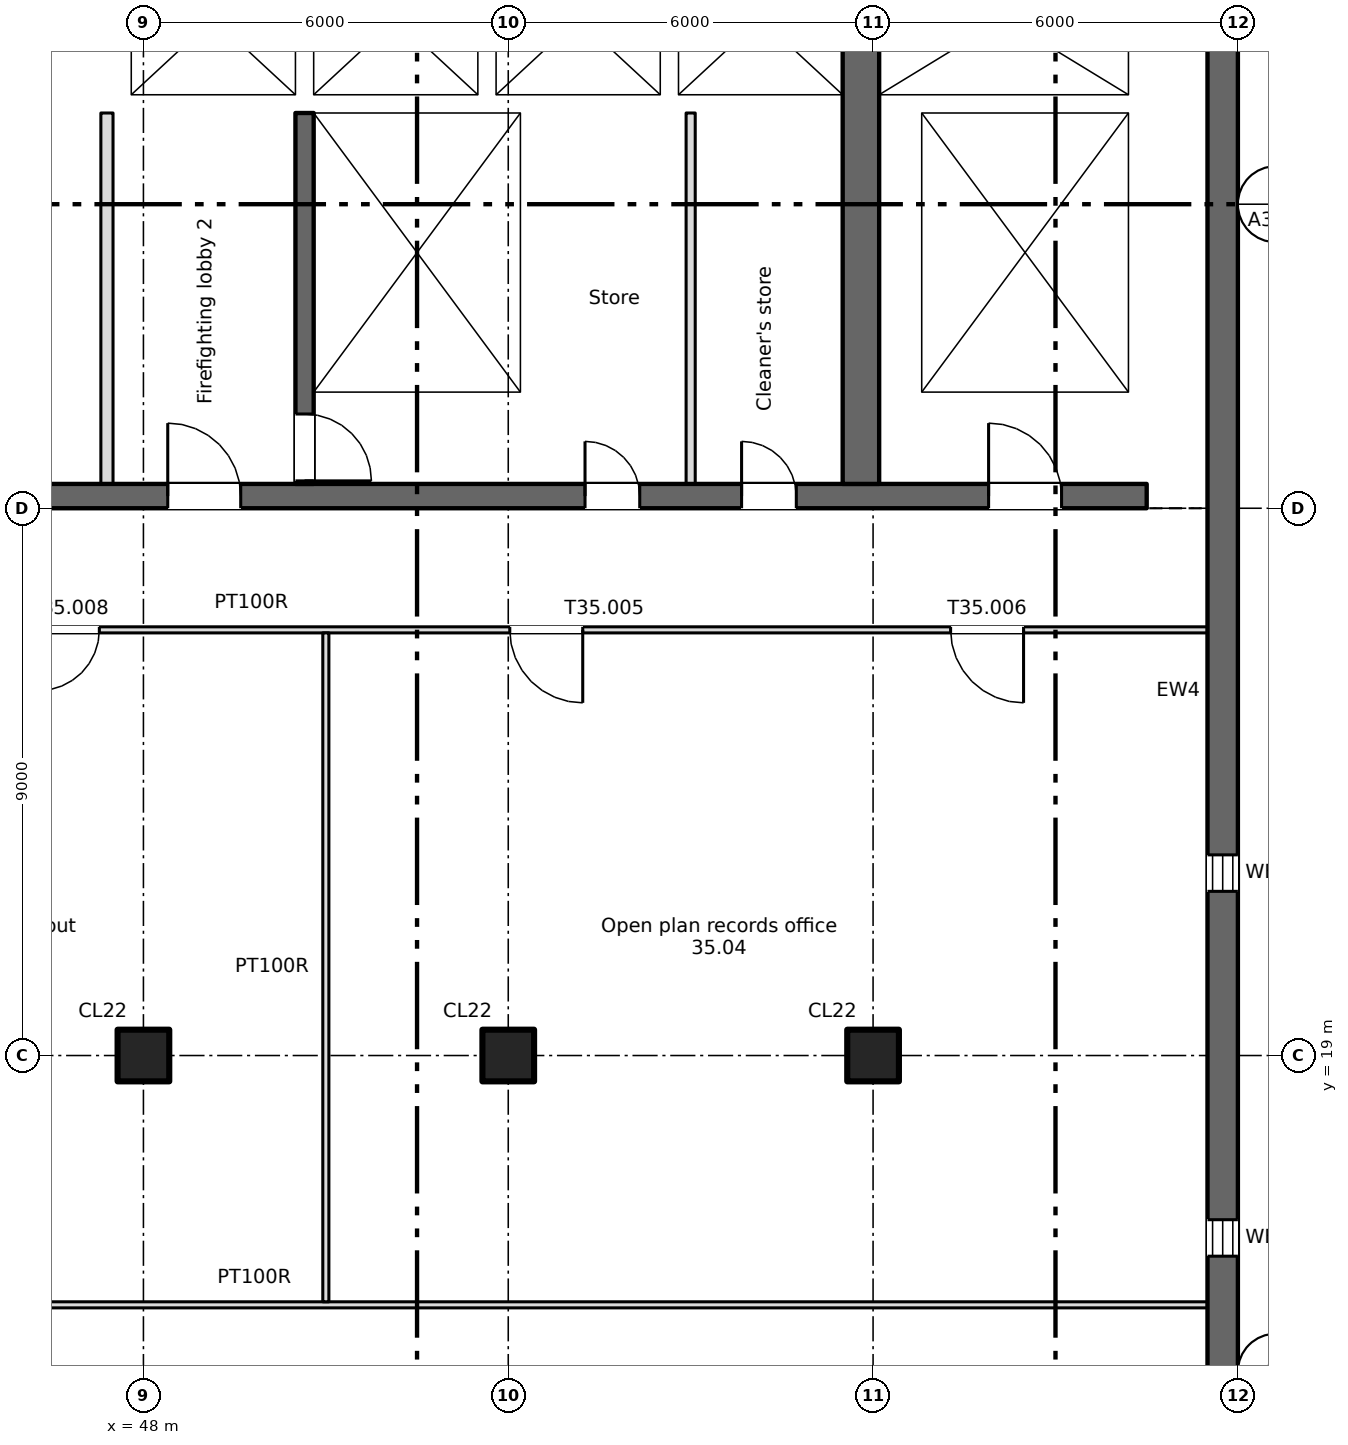
"""IFC4 building model, lengths in metres.
Left out: names, types, materials, properties, quantities, classifications, styles, units other than length and angle.
Written with IfcOpenShell. Run it as: python <this file> out.ifc"""

import sys

from ifc_helpers import new_model, si_unit, direction, frame, frame_2d, origin, origin_2d, place, context, subcontext, project, spatial, rectangle, extrude, element, fill, save


model = new_model("IFC4")
c1 = context("Model", 3, precision=1e-05, world=origin(), true_north=direction((0.0, 1.0)))
c2 = subcontext(c1, "Body", "Model", "MODEL_VIEW")
j1 = project(units=[si_unit("LENGTHUNIT", "METRE"), si_unit("PLANEANGLEUNIT", "RADIAN")], contexts=[c1])
p1 = place(None, origin())
s1 = spatial("IfcSite", under=j1, at=p1, CompositionType="ELEMENT")
p2 = place(p1, origin())
s2 = spatial("IfcBuilding", under=s1, at=p2, CompositionType="ELEMENT")
p3 = place(p2, frame((0.0, 0.0, 246.95)))
s3 = spatial("IfcBuildingStorey", under=s2, at=p3, CompositionType="ELEMENT", Elevation=246.95)
for number, where, z_axis, x_axis in (
    (1, (48.0, 19.0, 0.0), (0.0, 0.0, 1.0), (1.0, 0.0, 0.0)),
    (2, (54.0, 19.0, 0.0), (0.0, 0.0, 1.0), (1.0, 0.0, 0.0)),
    (3, (60.0, 19.0, 0.0), (0.0, 0.0, 1.0), (1.0, 0.0, 0.0)),
):
    element("IfcColumn", number, at=place(p3, frame(where, z_axis=z_axis, x_axis=x_axis)), inside=s3, PredefinedType="COLUMN", context=c2, shape_type="SweptSolid", body=[
        extrude(rectangle(XDim=0.85, YDim=0.85, at=origin_2d()), origin(), (0.0, 0.0, 1.0), 3.4),
    ])
p4 = place(p3, frame((65.75, 8.5, 0.0), z_axis=(0.0, 0.0, 1.0), x_axis=(0.0, 1.0, 0.0)))
e4 = element("IfcWall", 4, at=p4, inside=s3, PredefinedType="SHEAR", context=c2, shape_type="SweptSolid", body=[
    extrude(rectangle(XDim=33.0, YDim=0.5, at=frame_2d((16.5, 0.0))), origin(), (0.0, 0.0, 1.0), 3.4),
])
p5 = place(p4, frame((1.2, 0.0, 0.6)))
e5 = element("IfcOpeningElement", 5, at=p5, cuts=e4, PredefinedType="OPENING", context=c2, shape_type="SweptSolid", body=[
    extrude(rectangle(XDim=0.6, YDim=2.4, at=frame_2d((0.3, 1.2))), frame((0.0, 0.26, 0.0), z_axis=(0.0, -1.0, 0.0), x_axis=(1.0, 0.0, 0.0)), (0.0, 0.0, 1.0), 0.52),
])
p6 = place(p4, frame((7.2, 0.0, 0.6)))
e6 = element("IfcOpeningElement", 6, at=p6, cuts=e4, PredefinedType="OPENING", context=c2, shape_type="SweptSolid", body=[
    extrude(rectangle(XDim=0.6, YDim=2.4, at=frame_2d((0.3, 1.2))), frame((0.0, 0.26, 0.0), z_axis=(0.0, -1.0, 0.0), x_axis=(1.0, 0.0, 0.0)), (0.0, 0.0, 1.0), 0.52),
])
p7 = place(p4, frame((13.2, 0.0, 0.6)))
e7 = element("IfcOpeningElement", 7, at=p7, cuts=e4, PredefinedType="OPENING", context=c2, shape_type="SweptSolid", body=[
    extrude(rectangle(XDim=0.6, YDim=2.4, at=frame_2d((0.3, 1.2))), frame((0.0, 0.26, 0.0), z_axis=(0.0, -1.0, 0.0), x_axis=(1.0, 0.0, 0.0)), (0.0, 0.0, 1.0), 0.52),
])
p8 = place(p3, frame((6.5, 28.2, 0.0), z_axis=(0.0, 0.0, 1.0), x_axis=(1.0, 0.0, 0.0)))
e8 = element("IfcWall", 8, at=p8, inside=s3, PredefinedType="SHEAR", context=c2, shape_type="SweptSolid", body=[
    extrude(rectangle(XDim=58.0, YDim=0.4, at=frame_2d((29.0, 0.0))), origin(), (0.0, 0.0, 1.0), 3.4),
])
p9 = place(p8, frame((14.05, 0.0, 0.0)))
e9 = element("IfcOpeningElement", 9, at=p9, cuts=e8, PredefinedType="OPENING", context=c2, shape_type="SweptSolid", body=[
    extrude(rectangle(XDim=0.9, YDim=2.1, at=frame_2d((0.45, 1.05))), frame((0.0, 0.21, 0.0), z_axis=(0.0, -1.0, 0.0), x_axis=(1.0, 0.0, 0.0)), (0.0, 0.0, 1.0), 0.42),
])
p10 = place(p8, frame((48.762, 0.0, 0.0)))
e10 = element("IfcOpeningElement", 10, at=p10, cuts=e8, PredefinedType="OPENING", context=c2, shape_type="SweptSolid", body=[
    extrude(rectangle(XDim=0.9, YDim=2.1, at=frame_2d((0.45, 1.05))), frame((0.0, 0.21, 0.0), z_axis=(0.0, -1.0, 0.0), x_axis=(1.0, 0.0, 0.0)), (0.0, 0.0, 1.0), 0.42),
])
p11 = place(p8, frame((51.337, 0.0, 0.0)))
e11 = element("IfcOpeningElement", 11, at=p11, cuts=e8, PredefinedType="OPENING", context=c2, shape_type="SweptSolid", body=[
    extrude(rectangle(XDim=0.9, YDim=2.1, at=frame_2d((0.45, 1.05))), frame((0.0, 0.21, 0.0), z_axis=(0.0, -1.0, 0.0), x_axis=(1.0, 0.0, 0.0)), (0.0, 0.0, 1.0), 0.42),
])
p12 = place(p8, frame((1.55, 0.0, 0.0)))
e12 = element("IfcOpeningElement", 12, at=p12, cuts=e8, PredefinedType="OPENING", context=c2, shape_type="SweptSolid", body=[
    extrude(rectangle(XDim=0.9, YDim=2.1, at=frame_2d((0.45, 1.05))), frame((0.0, 0.21, 0.0), z_axis=(0.0, -1.0, 0.0), x_axis=(1.0, 0.0, 0.0)), (0.0, 0.0, 1.0), 0.42),
])
p13 = place(p8, frame((4.9, 0.0, 0.0)))
e13 = element("IfcOpeningElement", 13, at=p13, cuts=e8, PredefinedType="OPENING", context=c2, shape_type="SweptSolid", body=[
    extrude(rectangle(XDim=1.2, YDim=2.1, at=frame_2d((0.6, 1.05))), frame((0.0, 0.21, 0.0), z_axis=(0.0, -1.0, 0.0), x_axis=(1.0, 0.0, 0.0)), (0.0, 0.0, 1.0), 0.42),
])
p14 = place(p8, frame((31.9, 0.0, 0.0)))
e14 = element("IfcOpeningElement", 14, at=p14, cuts=e8, PredefinedType="OPENING", context=c2, shape_type="SweptSolid", body=[
    extrude(rectangle(XDim=1.2, YDim=2.1, at=frame_2d((0.6, 1.05))), frame((0.0, 0.21, 0.0), z_axis=(0.0, -1.0, 0.0), x_axis=(1.0, 0.0, 0.0)), (0.0, 0.0, 1.0), 0.42),
])
p15 = place(p8, frame((55.4, 0.0, 0.0)))
e15 = element("IfcOpeningElement", 15, at=p15, cuts=e8, PredefinedType="OPENING", context=c2, shape_type="SweptSolid", body=[
    extrude(rectangle(XDim=1.2, YDim=2.1, at=frame_2d((0.6, 1.05))), frame((0.0, 0.21, 0.0), z_axis=(0.0, -1.0, 0.0), x_axis=(1.0, 0.0, 0.0)), (0.0, 0.0, 1.0), 0.42),
])
p16 = place(p8, frame((21.9, 0.0, 0.0)))
e16 = element("IfcOpeningElement", 16, at=p16, cuts=e8, PredefinedType="OPENING", context=c2, shape_type="SweptSolid", body=[
    extrude(rectangle(XDim=1.2, YDim=2.1, at=frame_2d((0.6, 1.05))), frame((0.0, 0.21, 0.0), z_axis=(0.0, -1.0, 0.0), x_axis=(1.0, 0.0, 0.0)), (0.0, 0.0, 1.0), 0.42),
])
p17 = place(p8, frame((41.9, 0.0, 0.0)))
e17 = element("IfcOpeningElement", 17, at=p17, cuts=e8, PredefinedType="OPENING", context=c2, shape_type="SweptSolid", body=[
    extrude(rectangle(XDim=1.2, YDim=2.1, at=frame_2d((0.6, 1.05))), frame((0.0, 0.21, 0.0), z_axis=(0.0, -1.0, 0.0), x_axis=(1.0, 0.0, 0.0)), (0.0, 0.0, 1.0), 0.42),
])
p18 = place(p8, frame((25.05, 0.0, 0.0)))
e18 = element("IfcOpeningElement", 18, at=p18, cuts=e8, PredefinedType="OPENING", context=c2, shape_type="SweptSolid", body=[
    extrude(rectangle(XDim=2.4, YDim=2.1, at=frame_2d((1.2, 1.05))), frame((0.0, 0.21, 0.0), z_axis=(0.0, -1.0, 0.0), x_axis=(1.0, 0.0, 0.0)), (0.0, 0.0, 1.0), 0.42),
])
p19 = place(p8, frame((37.55, 0.0, 0.0)))
e19 = element("IfcOpeningElement", 19, at=p19, cuts=e8, PredefinedType="OPENING", context=c2, shape_type="SweptSolid", body=[
    extrude(rectangle(XDim=2.4, YDim=2.1, at=frame_2d((1.2, 1.05))), frame((0.0, 0.21, 0.0), z_axis=(0.0, -1.0, 0.0), x_axis=(1.0, 0.0, 0.0)), (0.0, 0.0, 1.0), 0.42),
])
p20 = place(p8, frame((8.25, 0.0, 0.0)))
e20 = element("IfcOpeningElement", 20, at=p20, cuts=e8, PredefinedType="OPENING", context=c2, shape_type="SweptSolid", body=[
    extrude(rectangle(XDim=2.4, YDim=2.1, at=frame_2d((1.2, 1.05))), frame((0.0, 0.21, 0.0), z_axis=(0.0, -1.0, 0.0), x_axis=(1.0, 0.0, 0.0)), (0.0, 0.0, 1.0), 0.42),
])
p21 = place(p8, frame((29.05, 0.0, 0.0)))
e21 = element("IfcOpeningElement", 21, at=p21, cuts=e8, PredefinedType="OPENING", context=c2, shape_type="SweptSolid", body=[
    extrude(rectangle(XDim=0.9, YDim=2.1, at=frame_2d((0.45, 1.05))), frame((0.0, 0.21, 0.0), z_axis=(0.0, -1.0, 0.0), x_axis=(1.0, 0.0, 0.0)), (0.0, 0.0, 1.0), 0.42),
])
p22 = place(p8, frame((35.05, 0.0, 0.0)))
e22 = element("IfcOpeningElement", 22, at=p22, cuts=e8, PredefinedType="OPENING", context=c2, shape_type="SweptSolid", body=[
    extrude(rectangle(XDim=0.9, YDim=2.1, at=frame_2d((0.45, 1.05))), frame((0.0, 0.21, 0.0), z_axis=(0.0, -1.0, 0.0), x_axis=(1.0, 0.0, 0.0)), (0.0, 0.0, 1.0), 0.42),
])
p23 = place(p3, frame((64.35, 34.8, 0.0), z_axis=(0.0, 0.0, 1.0), x_axis=(0.0, 1.0, 0.0)))
e23 = element("IfcWall", 23, at=p23, inside=s3, PredefinedType="SHEAR", context=c2, shape_type="SweptSolid", body=[
    extrude(rectangle(XDim=6.45, YDim=0.3, at=frame_2d((3.225, 0.0))), origin(), (0.0, 0.0, 1.0), 3.4),
])
p24 = place(p3, frame((59.8, 28.4, 0.0), z_axis=(0.0, 0.0, 1.0), x_axis=(0.0, 1.0, 0.0)))
e24 = element("IfcWall", 24, at=p24, inside=s3, PredefinedType="SHEAR", context=c2, shape_type="SweptSolid", body=[
    extrude(rectangle(XDim=15.1, YDim=0.6, at=frame_2d((7.55, 0.0))), origin(), (0.0, 0.0, 1.0), 3.4),
])
p25 = place(p24, frame((9.6, 0.0, 0.0)))
e25 = element("IfcOpeningElement", 25, at=p25, cuts=e24, PredefinedType="OPENING", context=c2, shape_type="SweptSolid", body=[
    extrude(rectangle(XDim=2.0, YDim=2.1, at=frame_2d((1.0, 1.05))), frame((0.0, 0.31, 0.0), z_axis=(0.0, -1.0, 0.0), x_axis=(1.0, 0.0, 0.0)), (0.0, 0.0, 1.0), 0.62),
])
p26 = place(p3, frame((50.65, 34.5, 0.0), z_axis=(0.0, 0.0, 1.0), x_axis=(0.0, -1.0, 0.0)))
e26 = element("IfcWall", 26, at=p26, inside=s3, PredefinedType="SHEAR", context=c2, shape_type="SweptSolid", body=[
    extrude(rectangle(XDim=6.1, YDim=0.3, at=frame_2d((3.05, 0.0))), origin(), (0.0, 0.0, 1.0), 3.4),
])
p27 = place(p26, frame((4.95, 0.0, 0.0)))
e27 = element("IfcOpeningElement", 27, at=p27, cuts=e26, PredefinedType="OPENING", context=c2, shape_type="SweptSolid", body=[
    extrude(rectangle(XDim=1.1, YDim=2.1, at=frame_2d((0.55, 1.05))), frame((0.0, 0.16, 0.0), z_axis=(0.0, -1.0, 0.0), x_axis=(1.0, 0.0, 0.0)), (0.0, 0.0, 1.0), 0.32),
])
p28 = place(p3, frame((54.35, 28.4, 0.0), z_axis=(0.0, 0.0, 1.0), x_axis=(0.0, 1.0, 0.0)))
e28 = element("IfcWall", 28, at=p28, inside=s3, PredefinedType="SHEAR", context=c2, shape_type="SweptSolid", body=[
    extrude(rectangle(XDim=6.1, YDim=0.3, at=frame_2d((3.05, 0.0))), origin(), (0.0, 0.0, 1.0), 3.4),
])
p29 = place(p3, frame((60.45, 28.4, 0.0), z_axis=(0.0, 0.0, 1.0), x_axis=(0.0, 1.0, 0.0)))
e29 = element("IfcWall", 29, at=p29, inside=s3, PredefinedType="SHEAR", context=c2, shape_type="SweptSolid", body=[
    extrude(rectangle(XDim=6.1, YDim=0.7, at=frame_2d((3.05, 0.0))), origin(), (0.0, 0.0, 1.0), 3.4),
])
p30 = place(p3, frame((64.35, 28.4, 0.0), z_axis=(0.0, 0.0, 1.0), x_axis=(0.0, 1.0, 0.0)))
e30 = element("IfcWall", 30, at=p30, inside=s3, PredefinedType="SHEAR", context=c2, shape_type="SweptSolid", body=[
    extrude(rectangle(XDim=6.1, YDim=0.3, at=frame_2d((3.05, 0.0))), origin(), (0.0, 0.0, 1.0), 3.4),
])
p31 = place(p3, frame((47.3, 34.65, 0.0), z_axis=(0.0, 0.0, 1.0), x_axis=(1.0, 0.0, 0.0)))
e31 = element("IfcWall", 31, at=p31, inside=s3, PredefinedType="SHEAR", context=c2, shape_type="SweptSolid", body=[
    extrude(rectangle(XDim=12.2, YDim=0.3, at=frame_2d((6.1, 0.0))), origin(), (0.0, 0.0, 1.0), 3.4),
])
p32 = place(p31, frame((1.3, 0.0, 0.0)))
e32 = element("IfcOpeningElement", 32, at=p32, cuts=e31, PredefinedType="OPENING", context=c2, shape_type="SweptSolid", body=[
    extrude(rectangle(XDim=1.1, YDim=2.1, at=frame_2d((0.55, 1.05))), frame((0.0, 0.16, 0.0), z_axis=(0.0, -1.0, 0.0), x_axis=(1.0, 0.0, 0.0)), (0.0, 0.0, 1.0), 0.32),
])
p33 = place(p3, frame((60.1, 34.65, 0.0), z_axis=(0.0, 0.0, 1.0), x_axis=(1.0, 0.0, 0.0)))
e33 = element("IfcWall", 33, at=p33, inside=s3, PredefinedType="SHEAR", context=c2, shape_type="SweptSolid", body=[
    extrude(rectangle(XDim=4.4, YDim=0.3, at=frame_2d((2.2, 0.0))), origin(), (0.0, 0.0, 1.0), 3.4),
])
p34 = place(p3, frame((47.55, 34.8, 0.0), z_axis=(0.0, 0.0, 1.0), x_axis=(0.0, 1.0, 0.0)))
e34 = element("IfcWall", 34, at=p34, inside=s3, PredefinedType="SHEAR", context=c2, shape_type="SweptSolid", body=[
    extrude(rectangle(XDim=2.5, YDim=0.5, at=frame_2d((1.25, 0.0))), origin(), (0.0, 0.0, 1.0), 3.4),
])
for number, where, z_axis, x_axis in (
    (35, (50.65, 34.8, 0.0), (0.0, 0.0, 1.0), (0.0, 1.0, 0.0)),
    (36, (53.65, 34.8, 0.0), (0.0, 0.0, 1.0), (0.0, 1.0, 0.0)),
    (37, (56.65, 34.8, 0.0), (0.0, 0.0, 1.0), (0.0, 1.0, 0.0)),
):
    element("IfcWall", number, at=place(p3, frame(where, z_axis=z_axis, x_axis=x_axis)), inside=s3, PredefinedType="SHEAR", context=c2, shape_type="SweptSolid", body=[
        extrude(rectangle(XDim=2.5, YDim=0.3, at=frame_2d((1.25, 0.0))), origin(), (0.0, 0.0, 1.0), 3.4),
    ])
p35 = place(p3, frame((47.4, 28.4, 0.0), z_axis=(0.0, 0.0, 1.0), x_axis=(0.0, 1.0, 0.0)))
e38 = element("IfcWall", 38, at=p35, inside=s3, PredefinedType="PARTITIONING", context=c2, shape_type="SweptSolid", body=[
    extrude(rectangle(XDim=6.1, YDim=0.2, at=frame_2d((3.05, 0.0))), origin(), (0.0, 0.0, 1.0), 3.4),
])
p36 = place(p3, frame((57.0, 28.4, 0.0), z_axis=(0.0, 0.0, 1.0), x_axis=(0.0, 1.0, 0.0)))
e39 = element("IfcWall", 39, at=p36, inside=s3, PredefinedType="PARTITIONING", context=c2, shape_type="SweptSolid", body=[
    extrude(rectangle(XDim=6.1, YDim=0.15, at=frame_2d((3.05, 0.0))), origin(), (0.0, 0.0, 1.0), 3.4),
])
p37 = place(p3, frame((34.15, 14.9, 0.0), z_axis=(0.0, 0.0, 1.0), x_axis=(1.0, 0.0, 0.0)))
e40 = element("IfcWall", 40, at=p37, inside=s3, PredefinedType="PARTITIONING", context=c2, shape_type="SweptSolid", body=[
    extrude(rectangle(XDim=31.35, YDim=0.1, at=frame_2d((15.675, 0.0))), origin(), (0.0, 0.0, 1.0), 3.4),
])
p38 = place(p3, frame((34.05, 26.0, 0.0), z_axis=(0.0, 0.0, 1.0), x_axis=(1.0, 0.0, 0.0)))
e41 = element("IfcWall", 41, at=p38, inside=s3, PredefinedType="PARTITIONING", context=c2, shape_type="SweptSolid", body=[
    extrude(rectangle(XDim=31.45, YDim=0.1, at=frame_2d((15.725, 0.0))), origin(), (0.0, 0.0, 1.0), 3.4),
])
p39 = place(p38, frame((19.975, 0.0, 0.0)))
e42 = element("IfcOpeningElement", 42, at=p39, cuts=e41, PredefinedType="OPENING", context=c2, shape_type="SweptSolid", body=[
    extrude(rectangle(XDim=1.2, YDim=2.1, at=frame_2d((0.6, 1.05))), frame((0.0, 0.06, 0.0), z_axis=(0.0, -1.0, 0.0), x_axis=(1.0, 0.0, 0.0)), (0.0, 0.0, 1.0), 0.12),
])
p40 = place(p38, frame((27.225, 0.0, 0.0)))
e43 = element("IfcOpeningElement", 43, at=p40, cuts=e41, PredefinedType="OPENING", context=c2, shape_type="SweptSolid", body=[
    extrude(rectangle(XDim=1.2, YDim=2.1, at=frame_2d((0.6, 1.05))), frame((0.0, 0.06, 0.0), z_axis=(0.0, -1.0, 0.0), x_axis=(1.0, 0.0, 0.0)), (0.0, 0.0, 1.0), 0.12),
])
p41 = place(p38, frame((3.775, 0.0, 0.0)))
e44 = element("IfcOpeningElement", 44, at=p41, cuts=e41, PredefinedType="OPENING", context=c2, shape_type="SweptSolid", body=[
    extrude(rectangle(XDim=1.0, YDim=2.1, at=frame_2d((0.5, 1.05))), frame((0.0, 0.06, 0.0), z_axis=(0.0, -1.0, 0.0), x_axis=(1.0, 0.0, 0.0)), (0.0, 0.0, 1.0), 0.12),
])
p42 = place(p38, frame((12.225, 0.0, 0.0)))
e45 = element("IfcOpeningElement", 45, at=p42, cuts=e41, PredefinedType="OPENING", context=c2, shape_type="SweptSolid", body=[
    extrude(rectangle(XDim=1.0, YDim=2.1, at=frame_2d((0.5, 1.05))), frame((0.0, 0.06, 0.0), z_axis=(0.0, -1.0, 0.0), x_axis=(1.0, 0.0, 0.0)), (0.0, 0.0, 1.0), 0.12),
])
p43 = place(p3, frame((51.0, 14.95, 0.0), z_axis=(0.0, 0.0, 1.0), x_axis=(0.0, 1.0, 0.0)))
e46 = element("IfcWall", 46, at=p43, inside=s3, PredefinedType="PARTITIONING", context=c2, shape_type="SweptSolid", body=[
    extrude(rectangle(XDim=11.0, YDim=0.1, at=frame_2d((5.5, 0.0))), origin(), (0.0, 0.0, 1.0), 3.4),
])
p44 = place(p6, origin())
e47 = element("IfcWindow", 47, at=p44, inside=s3, PartitioningType="SINGLE_PANEL", PredefinedType="WINDOW", context=c2, shape_type="SweptSolid", body=[
    extrude(rectangle(XDim=0.6, YDim=2.4, at=frame_2d((0.3, 1.2))), frame((0.0, 0.03, 0.0), z_axis=(0.0, -1.0, 0.0), x_axis=(1.0, 0.0, 0.0)), (0.0, 0.0, 1.0), 0.06),
])
fill(e6, e47)
p45 = place(p7, origin())
e48 = element("IfcWindow", 48, at=p45, inside=s3, PartitioningType="SINGLE_PANEL", PredefinedType="WINDOW", context=c2, shape_type="SweptSolid", body=[
    extrude(rectangle(XDim=0.6, YDim=2.4, at=frame_2d((0.3, 1.2))), frame((0.0, 0.03, 0.0), z_axis=(0.0, -1.0, 0.0), x_axis=(1.0, 0.0, 0.0)), (0.0, 0.0, 1.0), 0.06),
])
fill(e7, e48)
p46 = place(p10, origin())
e49 = element("IfcDoor", 49, at=p46, inside=s3, OperationType="SINGLE_SWING_LEFT", PredefinedType="DOOR", context=c2, shape_type="SweptSolid", body=[
    extrude(rectangle(XDim=0.9, YDim=2.1, at=frame_2d((0.45, 1.05))), frame((0.0, 0.025, 0.0), z_axis=(0.0, -1.0, 0.0), x_axis=(1.0, 0.0, 0.0)), (0.0, 0.0, 1.0), 0.05),
])
fill(e10, e49)
p47 = place(p11, origin())
e50 = element("IfcDoor", 50, at=p47, inside=s3, OperationType="SINGLE_SWING_LEFT", PredefinedType="DOOR", context=c2, shape_type="SweptSolid", body=[
    extrude(rectangle(XDim=0.9, YDim=2.1, at=frame_2d((0.45, 1.05))), frame((0.0, 0.025, 0.0), z_axis=(0.0, -1.0, 0.0), x_axis=(1.0, 0.0, 0.0)), (0.0, 0.0, 1.0), 0.05),
])
fill(e11, e50)
p48 = place(p32, origin())
e51 = element("IfcDoor", 51, at=p48, inside=s3, OperationType="SLIDING_TO_LEFT", PredefinedType="DOOR", context=c2, shape_type="SweptSolid", body=[
    extrude(rectangle(XDim=1.1, YDim=2.1, at=frame_2d((0.55, 1.05))), frame((0.0, 0.025, 0.0), z_axis=(0.0, -1.0, 0.0), x_axis=(1.0, 0.0, 0.0)), (0.0, 0.0, 1.0), 0.05),
])
fill(e32, e51)
p49 = place(p27, origin())
e52 = element("IfcDoor", 52, at=p49, inside=s3, OperationType="SINGLE_SWING_RIGHT", PredefinedType="DOOR", context=c2, shape_type="SweptSolid", body=[
    extrude(rectangle(XDim=1.1, YDim=2.1, at=frame_2d((0.55, 1.05))), frame((0.0, 0.025, 0.0), z_axis=(0.0, -1.0, 0.0), x_axis=(1.0, 0.0, 0.0)), (0.0, 0.0, 1.0), 0.05),
])
fill(e27, e52)
p50 = place(p15, origin())
e53 = element("IfcDoor", 53, at=p50, inside=s3, OperationType="SINGLE_SWING_LEFT", PredefinedType="DOOR", context=c2, shape_type="SweptSolid", body=[
    extrude(rectangle(XDim=1.2, YDim=2.1, at=frame_2d((0.6, 1.05))), frame((0.0, 0.025, 0.0), z_axis=(0.0, -1.0, 0.0), x_axis=(1.0, 0.0, 0.0)), (0.0, 0.0, 1.0), 0.05),
])
fill(e15, e53)
p51 = place(p17, origin())
e54 = element("IfcDoor", 54, at=p51, inside=s3, OperationType="SINGLE_SWING_LEFT", PredefinedType="DOOR", context=c2, shape_type="SweptSolid", body=[
    extrude(rectangle(XDim=1.2, YDim=2.1, at=frame_2d((0.6, 1.05))), frame((0.0, 0.025, 0.0), z_axis=(0.0, -1.0, 0.0), x_axis=(1.0, 0.0, 0.0)), (0.0, 0.0, 1.0), 0.05),
])
fill(e17, e54)
p52 = place(p39, origin())
e55 = element("IfcDoor", 55, at=p52, inside=s3, OperationType="SINGLE_SWING_RIGHT", PredefinedType="DOOR", context=c2, shape_type="SweptSolid", body=[
    extrude(rectangle(XDim=1.2, YDim=2.1, at=frame_2d((0.6, 1.05))), frame((0.0, 0.025, 0.0), z_axis=(0.0, -1.0, 0.0), x_axis=(1.0, 0.0, 0.0)), (0.0, 0.0, 1.0), 0.05),
])
fill(e42, e55)
p53 = place(p40, origin())
e56 = element("IfcDoor", 56, at=p53, inside=s3, OperationType="SINGLE_SWING_RIGHT", PredefinedType="DOOR", context=c2, shape_type="SweptSolid", body=[
    extrude(rectangle(XDim=1.2, YDim=2.1, at=frame_2d((0.6, 1.05))), frame((0.0, 0.025, 0.0), z_axis=(0.0, -1.0, 0.0), x_axis=(1.0, 0.0, 0.0)), (0.0, 0.0, 1.0), 0.05),
])
fill(e43, e56)
p54 = place(p42, origin())
e57 = element("IfcDoor", 57, at=p54, inside=s3, OperationType="SINGLE_SWING_LEFT", PredefinedType="DOOR", context=c2, shape_type="SweptSolid", body=[
    extrude(rectangle(XDim=1.0, YDim=2.1, at=frame_2d((0.5, 1.05))), frame((0.0, 0.025, 0.0), z_axis=(0.0, -1.0, 0.0), x_axis=(1.0, 0.0, 0.0)), (0.0, 0.0, 1.0), 0.05),
])
fill(e45, e57)
save(model, sys.argv[1])
